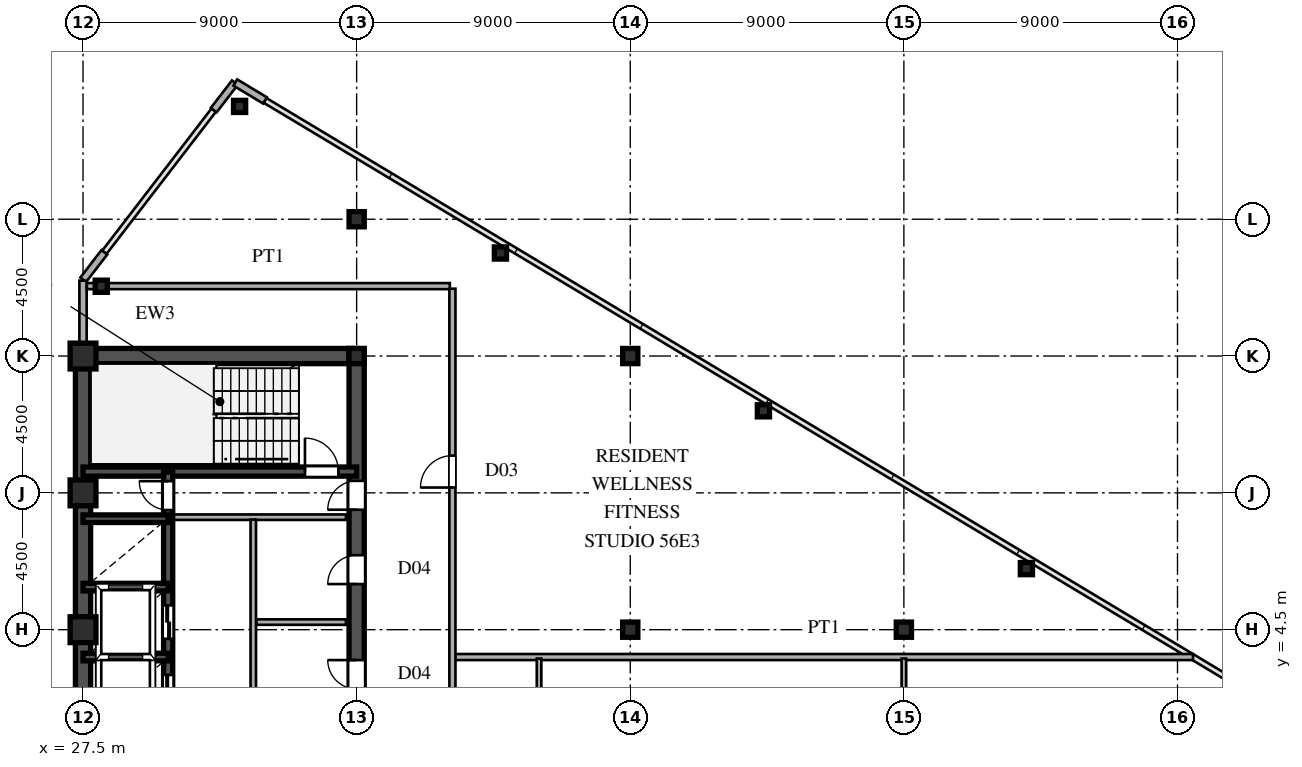
"""IFC4 building model, lengths in metres.
Left out: names, types, materials, properties, quantities, classifications, styles, units other than length and angle.
Written with IfcOpenShell. Run it as: python <this file> out.ifc"""

import sys

from ifc_helpers import new_model, si_unit, direction, frame, frame_2d, origin, origin_2d, place, context, subcontext, project, spatial, rectangle, hollow_rectangle, i_section, extrude, source, transform, mapped, element, fill, save


model = new_model("IFC4")
c1 = context("Model", 3, precision=1e-05, world=origin(), true_north=direction((0.0, 1.0)))
c2 = subcontext(c1, "Body", "Model", "MODEL_VIEW")
j1 = project(units=[si_unit("LENGTHUNIT", "METRE"), si_unit("PLANEANGLEUNIT", "RADIAN")], contexts=[c1])
p1 = place(None, origin())
s1 = spatial("IfcSite", under=j1, at=p1, CompositionType="ELEMENT")
p2 = place(p1, origin())
s2 = spatial("IfcBuilding", under=s1, at=p2, CompositionType="ELEMENT")
p3 = place(p2, frame((0.0, 0.0, 210.3)))
s3 = spatial("IfcBuildingStorey", under=s2, at=p3, CompositionType="ELEMENT", Elevation=210.3)
m1 = source(origin(), c2, "Body", "SweptSolid", [
    extrude(hollow_rectangle(XDim=0.85, YDim=0.85, WallThickness=0.036, at=origin_2d()), origin(), (0.0, 0.0, 1.0), 3.6),
])
for number, where, z_axis, x_axis in (
    (1, (27.5, 4.5, 0.0), (0.0, 0.0, 1.0), (1.0, 0.0, 0.0)),
    (2, (27.5, 9.0, 0.0), (0.0, 0.0, 1.0), (1.0, 0.0, 0.0)),
    (3, (27.5, 13.5, 0.0), (0.0, 0.0, 1.0), (1.0, 0.0, 0.0)),
):
    element("IfcColumn", number, at=place(p3, frame(where, z_axis=z_axis, x_axis=x_axis)), inside=s3, PredefinedType="COLUMN", context=c2, shape_type="MappedRepresentation", body=[
        mapped(m1, transform((0.0, 0.0, 0.0), scale=1.0)),
    ])
m2 = source(origin(), c2, "Body", "SweptSolid", [
    extrude(i_section(OverallWidth=0.5, OverallDepth=0.5, WebThickness=0.02, FlangeThickness=0.032, at=origin_2d()), origin(), (0.0, 0.0, 1.0), 3.6),
])
for number, where, z_axis, x_axis in (
    (4, (36.5, 13.5, 0.0), (0.0, 0.0, 1.0), (1.0, 0.0, 0.0)),
    (5, (36.5, 18.0, 0.0), (0.0, 0.0, 1.0), (1.0, 0.0, 0.0)),
    (6, (45.5, 4.5, 0.0), (0.0, 0.0, 1.0), (1.0, 0.0, 0.0)),
    (7, (45.5, 13.5, 0.0), (0.0, 0.0, 1.0), (1.0, 0.0, 0.0)),
    (8, (54.5, 4.5, 0.0), (0.0, 0.0, 1.0), (1.0, 0.0, 0.0)),
):
    element("IfcColumn", number, at=place(p3, frame(where, z_axis=z_axis, x_axis=x_axis)), inside=s3, PredefinedType="COLUMN", context=c2, shape_type="MappedRepresentation", body=[
        mapped(m2, transform((0.0, 0.0, 0.0), scale=1.0)),
    ])
m3 = source(origin(), c2, "Body", "SweptSolid", [
    extrude(hollow_rectangle(XDim=0.4, YDim=0.4, WallThickness=0.016, at=origin_2d()), origin(), (0.0, 0.0, 1.0), 3.6),
])
for number, where, z_axis, x_axis in (
    (9, (32.65, 21.71, 0.0), (0.0, 0.0, 1.0), (1.0, 0.0, 0.0)),
    (10, (28.1, 15.796, 0.0), (0.0, 0.0, 1.0), (1.0, 0.0, 0.0)),
    (11, (41.23, 16.889, 0.0), (0.0, 0.0, 1.0), (1.0, 0.0, 0.0)),
    (12, (49.88, 11.699, 0.0), (0.0, 0.0, 1.0), (1.0, 0.0, 0.0)),
    (13, (58.53, 6.509, 0.0), (0.0, 0.0, 1.0), (1.0, 0.0, 0.0)),
):
    element("IfcColumn", number, at=place(p3, frame(where, z_axis=z_axis, x_axis=x_axis)), inside=s3, PredefinedType="COLUMN", context=c2, shape_type="MappedRepresentation", body=[
        mapped(m3, transform((0.0, 0.0, 0.0), scale=1.0)),
    ])
for number, where, z_axis, x_axis in (
    (14, (33.486, 21.908, 0.0), (0.0, 0.0, 1.0), (-0.857, 0.515, 0.0)),
    (15, (32.494, 22.492, 0.0), (0.0, 0.0, 1.0), (-0.61, -0.793, 0.0)),
    (16, (28.201, 16.912, 0.0), (0.0, 0.0, 1.0), (-0.61, -0.793, 0.0)),
):
    element("IfcWall", number, at=place(p3, frame(where, z_axis=z_axis, x_axis=x_axis)), inside=s3, PredefinedType="SOLIDWALL", context=c2, shape_type="SweptSolid", body=[
        extrude(rectangle(XDim=1.14, YDim=0.24, at=frame_2d((0.57, 0.0))), origin(), (0.0, 0.0, 1.0), 3.38),
    ])
p4 = place(p3, frame((27.5, 13.755, 0.0), z_axis=(0.0, 0.0, 1.0), x_axis=(0.0, 1.0, 0.0)))
e17 = element("IfcWall", 17, at=p4, inside=s3, PredefinedType="SOLIDWALL", context=c2, shape_type="SweptSolid", body=[
    extrude(rectangle(XDim=0.62, YDim=0.24, at=frame_2d((0.31, 0.0))), origin(), (0.0, 0.0, 1.0), 2.88),
])
p5 = place(p3, frame((27.5, 14.375, 0.0), z_axis=(0.0, 0.0, 1.0), x_axis=(0.0, 1.0, 0.0)))
e18 = element("IfcWall", 18, at=p5, inside=s3, PredefinedType="SOLIDWALL", context=c2, shape_type="SweptSolid", body=[
    extrude(rectangle(XDim=1.605, YDim=0.24, at=frame_2d((0.803, 0.0))), origin(), (0.0, 0.0, 1.0), 3.38),
])
p6 = place(p3, frame((27.5, 1.3, 0.0), z_axis=(0.0, 0.0, 1.0), x_axis=(0.0, 1.0, 0.0)))
e19 = element("IfcWall", 19, at=p6, inside=s3, PredefinedType="SHEAR", context=c2, shape_type="SweptSolid", body=[
    extrude(rectangle(XDim=12.2, YDim=0.5, at=frame_2d((6.1, 0.0))), origin(), (0.0, 0.0, 1.0), 3.38),
])
p7 = place(p3, frame((27.5, 13.5, 0.0), z_axis=(0.0, 0.0, 1.0), x_axis=(1.0, 0.0, 0.0)))
e20 = element("IfcWall", 20, at=p7, inside=s3, PredefinedType="SHEAR", context=c2, shape_type="SweptSolid", body=[
    extrude(rectangle(XDim=9.0, YDim=0.5, at=frame_2d((4.5, 0.0))), origin(), (0.0, 0.0, 1.0), 3.38),
])
p8 = place(p3, frame((36.5, 8.2, 0.0), z_axis=(0.0, 0.0, 1.0), x_axis=(0.0, 1.0, 0.0)))
e21 = element("IfcWall", 21, at=p8, inside=s3, PredefinedType="SHEAR", context=c2, shape_type="SweptSolid", body=[
    extrude(rectangle(XDim=5.45, YDim=0.5, at=frame_2d((2.725, 0.0))), origin(), (0.0, 0.0, 1.0), 3.38),
])
p9 = place(p8, frame((0.245, 0.0, 0.0)))
e22 = element("IfcOpeningElement", 22, at=p9, cuts=e21, PredefinedType="OPENING", context=c2, shape_type="SweptSolid", body=[
    extrude(rectangle(XDim=0.95, YDim=2.15, at=frame_2d((0.475, 1.075))), frame((0.0, 0.26, 0.0), z_axis=(0.0, -1.0, 0.0), x_axis=(1.0, 0.0, 0.0)), (0.0, 0.0, 1.0), 0.52),
])
p10 = place(p3, frame((36.5, 1.3, 0.0), z_axis=(0.0, 0.0, 1.0), x_axis=(0.0, 1.0, 0.0)))
e23 = element("IfcWall", 23, at=p10, inside=s3, PredefinedType="SHEAR", context=c2, shape_type="SweptSolid", body=[
    extrude(rectangle(XDim=3.45, YDim=0.5, at=frame_2d((1.725, 0.0))), origin(), (0.0, 0.0, 1.0), 3.38),
])
p11 = place(p10, frame((1.25, 0.0, 0.0)))
e24 = element("IfcOpeningElement", 24, at=p11, cuts=e23, PredefinedType="OPENING", context=c2, shape_type="SweptSolid", body=[
    extrude(rectangle(XDim=0.95, YDim=2.15, at=frame_2d((0.475, 1.075))), frame((0.0, 0.26, 0.0), z_axis=(0.0, -1.0, 0.0), x_axis=(1.0, 0.0, 0.0)), (0.0, 0.0, 1.0), 0.52),
])
p12 = place(p3, frame((36.5, 4.75, 0.0), z_axis=(0.0, 0.0, 1.0), x_axis=(0.0, 1.0, 0.0)))
e25 = element("IfcWall", 25, at=p12, inside=s3, PredefinedType="SHEAR", context=c2, shape_type="SweptSolid", body=[
    extrude(rectangle(XDim=3.45, YDim=0.5, at=frame_2d((1.725, 0.0))), origin(), (0.0, 0.0, 1.0), 3.38),
])
p13 = place(p12, frame((1.25, 0.0, 0.0)))
e26 = element("IfcOpeningElement", 26, at=p13, cuts=e25, PredefinedType="OPENING", context=c2, shape_type="SweptSolid", body=[
    extrude(rectangle(XDim=0.95, YDim=2.15, at=frame_2d((0.475, 1.075))), frame((0.0, 0.26, 0.0), z_axis=(0.0, -1.0, 0.0), x_axis=(1.0, 0.0, 0.0)), (0.0, 0.0, 1.0), 0.52),
])
p14 = place(p3, frame((27.5, 9.7, 0.0), z_axis=(0.0, 0.0, 1.0), x_axis=(1.0, 0.0, 0.0)))
e27 = element("IfcWall", 27, at=p14, inside=s3, PredefinedType="SHEAR", context=c2, shape_type="SweptSolid", body=[
    extrude(rectangle(XDim=9.0, YDim=0.3, at=frame_2d((4.5, 0.0))), origin(), (0.0, 0.0, 1.0), 3.38),
])
p15 = place(p14, frame((7.3, 0.0, 0.0)))
e28 = element("IfcOpeningElement", 28, at=p15, cuts=e27, PredefinedType="OPENING", context=c2, shape_type="SweptSolid", body=[
    extrude(rectangle(XDim=1.1, YDim=2.2, at=frame_2d((0.55, 1.1))), frame((0.0, 0.16, 0.0), z_axis=(0.0, -1.0, 0.0), x_axis=(1.0, 0.0, 0.0)), (0.0, 0.0, 1.0), 0.32),
])
for number, where, z_axis, x_axis in (
    (29, (27.5, 3.6, 0.0), (0.0, 0.0, 1.0), (1.0, 0.0, 0.0)),
    (30, (27.5, 5.9, 0.0), (0.0, 0.0, 1.0), (1.0, 0.0, 0.0)),
    (31, (27.5, 8.15, 0.0), (0.0, 0.0, 1.0), (1.0, 0.0, 0.0)),
):
    element("IfcWall", number, at=place(p3, frame(where, z_axis=z_axis, x_axis=x_axis)), inside=s3, PredefinedType="SHEAR", context=c2, shape_type="SweptSolid", body=[
        extrude(rectangle(XDim=2.8, YDim=0.25, at=frame_2d((1.4, 0.0))), origin(), (0.0, 0.0, 1.0), 3.38),
    ])
p16 = place(p3, frame((30.3, 1.32, 0.0), z_axis=(0.0, 0.0, 1.0), x_axis=(0.0, 1.0, 0.0)))
e32 = element("IfcWall", 32, at=p16, inside=s3, PredefinedType="SHEAR", context=c2, shape_type="SweptSolid", body=[
    extrude(rectangle(XDim=2.28, YDim=0.3, at=frame_2d((1.14, 0.0))), origin(), (0.0, 0.0, 1.0), 3.38),
])
p17 = place(p16, frame((0.59, 0.0, 0.0)))
e33 = element("IfcOpeningElement", 33, at=p17, cuts=e32, PredefinedType="OPENING", context=c2, shape_type="SweptSolid", body=[
    extrude(rectangle(XDim=1.1, YDim=2.2, at=frame_2d((0.55, 1.1))), frame((0.0, 0.16, 0.0), z_axis=(0.0, -1.0, 0.0), x_axis=(1.0, 0.0, 0.0)), (0.0, 0.0, 1.0), 0.32),
])
p18 = place(p3, frame((30.3, 3.6, 0.0), z_axis=(0.0, 0.0, 1.0), x_axis=(0.0, 1.0, 0.0)))
e34 = element("IfcWall", 34, at=p18, inside=s3, PredefinedType="SHEAR", context=c2, shape_type="SweptSolid", body=[
    extrude(rectangle(XDim=2.3, YDim=0.3, at=frame_2d((1.15, 0.0))), origin(), (0.0, 0.0, 1.0), 3.38),
])
p19 = place(p18, frame((0.6, 0.0, 0.0)))
e35 = element("IfcOpeningElement", 35, at=p19, cuts=e34, PredefinedType="OPENING", context=c2, shape_type="SweptSolid", body=[
    extrude(rectangle(XDim=1.1, YDim=2.2, at=frame_2d((0.55, 1.1))), frame((0.0, 0.16, 0.0), z_axis=(0.0, -1.0, 0.0), x_axis=(1.0, 0.0, 0.0)), (0.0, 0.0, 1.0), 0.32),
])
p20 = place(p3, frame((30.3, 5.9, 0.0), z_axis=(0.0, 0.0, 1.0), x_axis=(0.0, 1.0, 0.0)))
e36 = element("IfcWall", 36, at=p20, inside=s3, PredefinedType="SHEAR", context=c2, shape_type="SweptSolid", body=[
    extrude(rectangle(XDim=2.25, YDim=0.3, at=frame_2d((1.125, 0.0))), origin(), (0.0, 0.0, 1.0), 3.38),
])
p21 = place(p3, frame((30.3, 8.15, 0.0), z_axis=(0.0, 0.0, 1.0), x_axis=(0.0, 1.0, 0.0)))
e37 = element("IfcWall", 37, at=p21, inside=s3, PredefinedType="SHEAR", context=c2, shape_type="SweptSolid", body=[
    extrude(rectangle(XDim=1.53, YDim=0.3, at=frame_2d((0.765, 0.0))), origin(), (0.0, 0.0, 1.0), 3.38),
])
p22 = place(p21, frame((0.285, 0.0, 0.0)))
e38 = element("IfcOpeningElement", 38, at=p22, cuts=e37, PredefinedType="OPENING", context=c2, shape_type="SweptSolid", body=[
    extrude(rectangle(XDim=0.95, YDim=2.15, at=frame_2d((0.475, 1.075))), frame((0.0, 0.16, 0.0), z_axis=(0.0, -1.0, 0.0), x_axis=(1.0, 0.0, 0.0)), (0.0, 0.0, 1.0), 0.32),
])
p23 = place(p3, frame((30.45, 8.2, 0.0), z_axis=(0.0, 0.0, 1.0), x_axis=(1.0, 0.0, 0.0)))
e39 = element("IfcWall", 39, at=p23, inside=s3, PredefinedType="PARTITIONING", context=c2, shape_type="SweptSolid", body=[
    extrude(rectangle(XDim=5.7, YDim=0.18, at=frame_2d((2.85, 0.0))), origin(), (0.0, 0.0, 1.0), 3.38),
])
p24 = place(p3, frame((33.1, 1.38, 0.0), z_axis=(0.0, 0.0, 1.0), x_axis=(0.0, 1.0, 0.0)))
e40 = element("IfcWall", 40, at=p24, inside=s3, PredefinedType="PARTITIONING", context=c2, shape_type="SweptSolid", body=[
    extrude(rectangle(XDim=6.74, YDim=0.18, at=frame_2d((3.37, 0.0))), origin(), (0.0, 0.0, 1.0), 3.38),
])
p25 = place(p3, frame((33.2, 4.75, 0.0), z_axis=(0.0, 0.0, 1.0), x_axis=(1.0, 0.0, 0.0)))
e41 = element("IfcWall", 41, at=p25, inside=s3, PredefinedType="PARTITIONING", context=c2, shape_type="SweptSolid", body=[
    extrude(rectangle(XDim=2.95, YDim=0.18, at=frame_2d((1.475, 0.0))), origin(), (0.0, 0.0, 1.0), 3.38),
])
p26 = place(p3, frame((39.73, 3.6, 0.0), z_axis=(0.0, 0.0, 1.0), x_axis=(1.0, 0.0, 0.0)))
e42 = element("IfcWall", 42, at=p26, inside=s3, PredefinedType="PARTITIONING", context=c2, shape_type="SweptSolid", body=[
    extrude(rectangle(XDim=24.28, YDim=0.2, at=frame_2d((12.14, 0.0))), origin(), (0.0, 0.0, 1.0), 3.38),
])
p27 = place(p3, frame((27.625, 15.8, 0.0), z_axis=(0.0, 0.0, 1.0), x_axis=(1.0, 0.0, 0.0)))
e43 = element("IfcWall", 43, at=p27, inside=s3, PredefinedType="PARTITIONING", context=c2, shape_type="SweptSolid", body=[
    extrude(rectangle(XDim=11.94, YDim=0.2, at=frame_2d((5.97, 0.0))), origin(), (0.0, 0.0, 1.0), 3.38),
])
p28 = place(p3, frame((39.65, -15.715, 0.0), z_axis=(0.0, 0.0, 1.0), x_axis=(0.0, 1.0, 0.0)))
e44 = element("IfcWall", 44, at=p28, inside=s3, PredefinedType="PARTITIONING", context=c2, shape_type="SweptSolid", body=[
    extrude(rectangle(XDim=31.43, YDim=0.2, at=frame_2d((15.715, 0.0))), origin(), (0.0, 0.0, 1.0), 3.38),
])
p29 = place(p28, frame((2.59, 0.0, 0.0)))
e45 = element("IfcOpeningElement", 45, at=p29, cuts=e44, PredefinedType="OPENING", context=c2, shape_type="SweptSolid", body=[
    extrude(rectangle(XDim=1.05, YDim=2.25, at=frame_2d((0.525, 1.125))), frame((0.0, 0.11, 0.0), z_axis=(0.0, -1.0, 0.0), x_axis=(1.0, 0.0, 0.0)), (0.0, 0.0, 1.0), 0.22),
])
p30 = place(p28, frame((12.095, 0.0, 0.0)))
e46 = element("IfcOpeningElement", 46, at=p30, cuts=e44, PredefinedType="OPENING", context=c2, shape_type="SweptSolid", body=[
    extrude(rectangle(XDim=1.05, YDim=2.25, at=frame_2d((0.525, 1.125))), frame((0.0, 0.11, 0.0), z_axis=(0.0, -1.0, 0.0), x_axis=(1.0, 0.0, 0.0)), (0.0, 0.0, 1.0), 0.22),
])
p31 = place(p28, frame((24.89, 0.0, 0.0)))
e47 = element("IfcOpeningElement", 47, at=p31, cuts=e44, PredefinedType="OPENING", context=c2, shape_type="SweptSolid", body=[
    extrude(rectangle(XDim=1.05, YDim=2.25, at=frame_2d((0.525, 1.125))), frame((0.0, 0.11, 0.0), z_axis=(0.0, -1.0, 0.0), x_axis=(1.0, 0.0, 0.0)), (0.0, 0.0, 1.0), 0.22),
])
p32 = place(p3, frame((42.5, -0.248, 0.0), z_axis=(0.0, 0.0, 1.0), x_axis=(0.0, 1.0, 0.0)))
e48 = element("IfcWall", 48, at=p32, inside=s3, PredefinedType="PARTITIONING", context=c2, shape_type="SweptSolid", body=[
    extrude(rectangle(XDim=3.798, YDim=0.15, at=frame_2d((1.899, 0.0))), origin(), (0.0, 0.0, 1.0), 3.38),
])
p33 = place(p3, frame((54.5, -9.335, 0.0), z_axis=(0.0, 0.0, 1.0), x_axis=(0.0, 1.0, 0.0)))
e49 = element("IfcWall", 49, at=p33, inside=s3, PredefinedType="PARTITIONING", context=c2, shape_type="SweptSolid", body=[
    extrude(rectangle(XDim=12.885, YDim=0.15, at=frame_2d((6.442, 0.0))), origin(), (0.0, 0.0, 1.0), 2.78),
])
p34 = place(p33, frame((5.96, 0.0, 0.0)))
e50 = element("IfcOpeningElement", 50, at=p34, cuts=e49, PredefinedType="OPENING", context=c2, shape_type="SweptSolid", body=[
    extrude(rectangle(XDim=0.95, YDim=2.15, at=frame_2d((0.475, 1.075))), frame((0.0, 0.085, 0.0), z_axis=(0.0, -1.0, 0.0), x_axis=(1.0, 0.0, 0.0)), (0.0, 0.0, 1.0), 0.17),
])
p35 = place(p33, frame((1.677, 0.0, 0.0)))
e51 = element("IfcOpeningElement", 51, at=p35, cuts=e49, PredefinedType="OPENING", context=c2, shape_type="SweptSolid", body=[
    extrude(rectangle(XDim=0.95, YDim=2.15, at=frame_2d((0.475, 1.075))), frame((0.0, 0.085, 0.0), z_axis=(0.0, -1.0, 0.0), x_axis=(1.0, 0.0, 0.0)), (0.0, 0.0, 1.0), 0.17),
])
p36 = place(p33, frame((10.293, 0.0, 0.0)))
e52 = element("IfcOpeningElement", 52, at=p36, cuts=e49, PredefinedType="OPENING", context=c2, shape_type="SweptSolid", body=[
    extrude(rectangle(XDim=0.95, YDim=2.15, at=frame_2d((0.475, 1.075))), frame((0.0, 0.085, 0.0), z_axis=(0.0, -1.0, 0.0), x_axis=(1.0, 0.0, 0.0)), (0.0, 0.0, 1.0), 0.17),
])
m4 = source(origin(), c2, "Body", "SweptSolid", [
    extrude(rectangle(XDim=0.95, YDim=2.15, at=frame_2d((0.475, 1.075))), frame((0.0, 0.025, 0.0), z_axis=(0.0, -1.0, 0.0), x_axis=(1.0, 0.0, 0.0)), (0.0, 0.0, 1.0), 0.05),
])
p37 = place(p9, origin())
e53 = element("IfcDoor", 53, at=p37, inside=s3, OperationType="SINGLE_SWING_LEFT", PredefinedType="DOOR", context=c2, shape_type="MappedRepresentation", body=[
    mapped(m4, transform((0.0, 0.0, 0.0), scale=1.0)),
])
fill(e22, e53)
p38 = place(p11, origin())
e54 = element("IfcDoor", 54, at=p38, inside=s3, OperationType="SINGLE_SWING_RIGHT", PredefinedType="DOOR", context=c2, shape_type="MappedRepresentation", body=[
    mapped(m4, transform((0.0, 0.0, 0.0), scale=1.0)),
])
fill(e24, e54)
p39 = place(p13, origin())
e55 = element("IfcDoor", 55, at=p39, inside=s3, OperationType="SINGLE_SWING_LEFT", PredefinedType="DOOR", context=c2, shape_type="MappedRepresentation", body=[
    mapped(m4, transform((0.0, 0.0, 0.0), scale=1.0)),
])
fill(e26, e55)
m5 = source(origin(), c2, "Body", "SweptSolid", [
    extrude(rectangle(XDim=1.1, YDim=2.2, at=frame_2d((0.55, 1.1))), frame((0.0, 0.025, 0.0), z_axis=(0.0, -1.0, 0.0), x_axis=(1.0, 0.0, 0.0)), (0.0, 0.0, 1.0), 0.05),
])
p40 = place(p15, origin())
e56 = element("IfcDoor", 56, at=p40, inside=s3, OperationType="SINGLE_SWING_LEFT", PredefinedType="DOOR", context=c2, shape_type="MappedRepresentation", body=[
    mapped(m5, transform((0.0, 0.0, 0.0), scale=1.0)),
])
fill(e28, e56)
m6 = source(origin(), c2, "Body", "SweptSolid", [
    extrude(rectangle(XDim=1.1, YDim=2.2, at=frame_2d((0.55, 1.1))), frame((0.0, 0.025, 0.0), z_axis=(0.0, -1.0, 0.0), x_axis=(1.0, 0.0, 0.0)), (0.0, 0.0, 1.0), 0.05),
])
p41 = place(p17, origin())
e57 = element("IfcDoor", 57, at=p41, inside=s3, OperationType="DOUBLE_DOOR_SLIDING", PredefinedType="DOOR", context=c2, shape_type="MappedRepresentation", body=[
    mapped(m6, transform((0.0, 0.0, 0.0), scale=1.0)),
])
fill(e33, e57)
p42 = place(p19, origin())
e58 = element("IfcDoor", 58, at=p42, inside=s3, OperationType="DOUBLE_DOOR_SLIDING", PredefinedType="DOOR", context=c2, shape_type="MappedRepresentation", body=[
    mapped(m6, transform((0.0, 0.0, 0.0), scale=1.0)),
])
fill(e35, e58)
p43 = place(p22, origin())
e59 = element("IfcDoor", 59, at=p43, inside=s3, OperationType="SINGLE_SWING_RIGHT", PredefinedType="DOOR", context=c2, shape_type="MappedRepresentation", body=[
    mapped(m4, transform((0.0, 0.0, 0.0), scale=1.0)),
])
fill(e38, e59)
m7 = source(origin(), c2, "Body", "SweptSolid", [
    extrude(rectangle(XDim=1.05, YDim=2.25, at=frame_2d((0.525, 1.125))), frame((0.0, 0.025, 0.0), z_axis=(0.0, -1.0, 0.0), x_axis=(1.0, 0.0, 0.0)), (0.0, 0.0, 1.0), 0.05),
])
p44 = place(p31, origin())
e60 = element("IfcDoor", 60, at=p44, inside=s3, OperationType="SINGLE_SWING_LEFT", PredefinedType="DOOR", context=c2, shape_type="MappedRepresentation", body=[
    mapped(m7, transform((0.0, 0.0, 0.0), scale=1.0)),
])
fill(e47, e60)
save(model, sys.argv[1])
